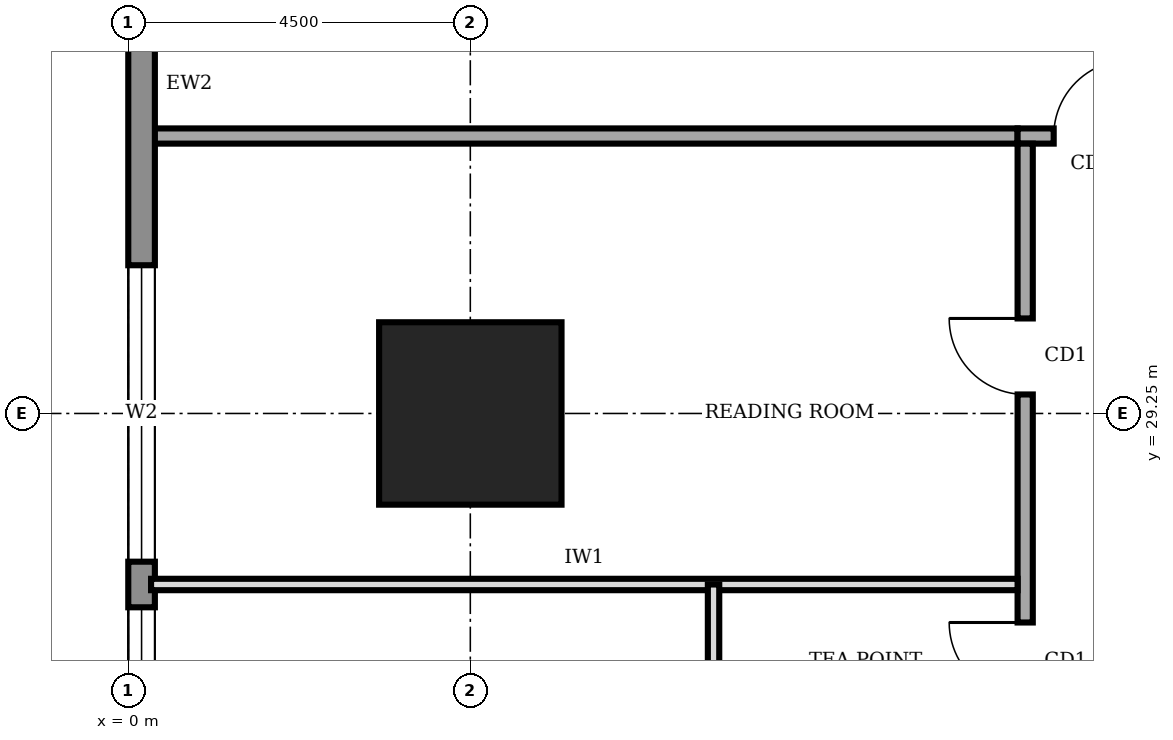
"""IFC4 building model, lengths in metres.
Left out: names, types, materials, properties, quantities, classifications, styles, units other than length and angle.
Written with IfcOpenShell. Run it as: python <this file> out.ifc"""

import sys

from ifc_helpers import new_model, si_unit, direction, frame, frame_2d, origin, origin_2d, place, context, subcontext, project, spatial, rectangle, extrude, element, fill, save


model = new_model("IFC4")
c1 = context("Model", 3, precision=1e-05, world=origin(), true_north=direction((0.0, 1.0)))
c2 = subcontext(c1, "Body", "Model", "MODEL_VIEW")
j1 = project(units=[si_unit("LENGTHUNIT", "METRE"), si_unit("PLANEANGLEUNIT", "RADIAN")], contexts=[c1])
p1 = place(None, origin())
s1 = spatial("IfcSite", under=j1, at=p1, CompositionType="ELEMENT")
p2 = place(p1, origin())
s2 = spatial("IfcBuilding", under=s1, at=p2, CompositionType="ELEMENT")
p3 = place(p2, frame((0.0, 0.0, 73.0)))
s3 = spatial("IfcBuildingStorey", under=s2, at=p3, CompositionType="ELEMENT", Elevation=73.0)
p4 = place(p3, frame((4.5, 29.25, 0.0), z_axis=(0.0, 0.0, 1.0), x_axis=(1.0, 0.0, 0.0)))
e1 = element("IfcColumn", 1, at=p4, inside=s3, PredefinedType="COLUMN", context=c2, shape_type="SweptSolid", body=[
    extrude(rectangle(XDim=2.4, YDim=2.4, at=origin_2d()), origin(), (0.0, 0.0, 1.0), 4.0),
])
p5 = place(p3, frame((0.175, 35.98, 0.0), z_axis=(0.0, 0.0, 1.0), x_axis=(0.0, -1.0, 0.0)))
e2 = element("IfcWall", 2, at=p5, inside=s3, PredefinedType="STANDARD", context=c2, shape_type="SweptSolid", body=[
    extrude(rectangle(XDim=31.46, YDim=0.35, at=frame_2d((15.73, 0.0))), origin(), (0.0, 0.0, 1.0), 3.75),
])
p6 = place(p5, frame((27.21, 0.0, 0.6)))
e3 = element("IfcOpeningElement", 3, at=p6, cuts=e2, PredefinedType="OPENING", context=c2, shape_type="SweptSolid", body=[
    extrude(rectangle(XDim=3.9, YDim=2.6, at=frame_2d((1.95, 1.3))), frame((0.0, 0.185, 0.0), z_axis=(0.0, -1.0, 0.0), x_axis=(1.0, 0.0, 0.0)), (0.0, 0.0, 1.0), 0.37),
])
p7 = place(p5, frame((22.78, 0.0, 0.6)))
e4 = element("IfcOpeningElement", 4, at=p7, cuts=e2, PredefinedType="OPENING", context=c2, shape_type="SweptSolid", body=[
    extrude(rectangle(XDim=3.9, YDim=2.6, at=frame_2d((1.95, 1.3))), frame((0.0, 0.185, 0.0), z_axis=(0.0, -1.0, 0.0), x_axis=(1.0, 0.0, 0.0)), (0.0, 0.0, 1.0), 0.37),
])
p8 = place(p5, frame((18.28, 0.0, 0.6)))
e5 = element("IfcOpeningElement", 5, at=p8, cuts=e2, PredefinedType="OPENING", context=c2, shape_type="SweptSolid", body=[
    extrude(rectangle(XDim=3.9, YDim=2.6, at=frame_2d((1.95, 1.3))), frame((0.0, 0.185, 0.0), z_axis=(0.0, -1.0, 0.0), x_axis=(1.0, 0.0, 0.0)), (0.0, 0.0, 1.0), 0.37),
])
p9 = place(p5, frame((13.78, 0.0, 0.6)))
e6 = element("IfcOpeningElement", 6, at=p9, cuts=e2, PredefinedType="OPENING", context=c2, shape_type="SweptSolid", body=[
    extrude(rectangle(XDim=3.9, YDim=2.6, at=frame_2d((1.95, 1.3))), frame((0.0, 0.185, 0.0), z_axis=(0.0, -1.0, 0.0), x_axis=(1.0, 0.0, 0.0)), (0.0, 0.0, 1.0), 0.37),
])
p10 = place(p5, frame((9.28, 0.0, 0.6)))
e7 = element("IfcOpeningElement", 7, at=p10, cuts=e2, PredefinedType="OPENING", context=c2, shape_type="SweptSolid", body=[
    extrude(rectangle(XDim=3.9, YDim=2.6, at=frame_2d((1.95, 1.3))), frame((0.0, 0.185, 0.0), z_axis=(0.0, -1.0, 0.0), x_axis=(1.0, 0.0, 0.0)), (0.0, 0.0, 1.0), 0.37),
])
p11 = place(p5, frame((4.78, 0.0, 0.6)))
e8 = element("IfcOpeningElement", 8, at=p11, cuts=e2, PredefinedType="OPENING", context=c2, shape_type="SweptSolid", body=[
    extrude(rectangle(XDim=3.9, YDim=2.6, at=frame_2d((1.95, 1.3))), frame((0.0, 0.185, 0.0), z_axis=(0.0, -1.0, 0.0), x_axis=(1.0, 0.0, 0.0)), (0.0, 0.0, 1.0), 0.37),
])
p12 = place(p3, frame((28.6, 32.9, 0.0), z_axis=(0.0, 0.0, 1.0), x_axis=(-1.0, 0.0, 0.0)))
e9 = element("IfcWall", 9, at=p12, inside=s3, PredefinedType="SOLIDWALL", context=c2, shape_type="SweptSolid", body=[
    extrude(rectangle(XDim=16.9, YDim=0.2, at=frame_2d((8.45, 0.0))), origin(), (0.0, 0.0, 1.0), 3.75),
])
p13 = place(p12, frame((15.425, 0.0, 0.0)))
e10 = element("IfcOpeningElement", 10, at=p13, cuts=e9, PredefinedType="OPENING", context=c2, shape_type="SweptSolid", body=[
    extrude(rectangle(XDim=1.0, YDim=2.1, at=frame_2d((0.5, 1.05))), frame((0.0, 0.11, 0.0), z_axis=(0.0, -1.0, 0.0), x_axis=(1.0, 0.0, 0.0)), (0.0, 0.0, 1.0), 0.22),
])
p14 = place(p12, frame((12.35, 0.0, 0.0)))
e11 = element("IfcOpeningElement", 11, at=p14, cuts=e9, PredefinedType="OPENING", context=c2, shape_type="SweptSolid", body=[
    extrude(rectangle(XDim=1.0, YDim=2.1, at=frame_2d((0.5, 1.05))), frame((0.0, 0.11, 0.0), z_axis=(0.0, -1.0, 0.0), x_axis=(1.0, 0.0, 0.0)), (0.0, 0.0, 1.0), 0.22),
])
p15 = place(p12, frame((5.6, 0.0, 0.0)))
e12 = element("IfcOpeningElement", 12, at=p15, cuts=e9, PredefinedType="OPENING", context=c2, shape_type="SweptSolid", body=[
    extrude(rectangle(XDim=1.0, YDim=2.1, at=frame_2d((0.5, 1.05))), frame((0.0, 0.11, 0.0), z_axis=(0.0, -1.0, 0.0), x_axis=(1.0, 0.0, 0.0)), (0.0, 0.0, 1.0), 0.22),
])
p16 = place(p12, frame((0.275, 0.0, 0.0)))
e13 = element("IfcOpeningElement", 13, at=p16, cuts=e9, PredefinedType="OPENING", context=c2, shape_type="SweptSolid", body=[
    extrude(rectangle(XDim=1.0, YDim=2.1, at=frame_2d((0.5, 1.05))), frame((0.0, 0.11, 0.0), z_axis=(0.0, -1.0, 0.0), x_axis=(1.0, 0.0, 0.0)), (0.0, 0.0, 1.0), 0.22),
])
p17 = place(p3, frame((11.8, 32.8, 0.0), z_axis=(0.0, 0.0, 1.0), x_axis=(0.0, -1.0, 0.0)))
e14 = element("IfcWall", 14, at=p17, inside=s3, PredefinedType="SOLIDWALL", context=c2, shape_type="SweptSolid", body=[
    extrude(rectangle(XDim=25.3, YDim=0.2, at=frame_2d((12.65, 0.0))), origin(), (0.0, 0.0, 1.0), 3.75),
])
p18 = place(p17, frame((21.8, 0.0, 0.0)))
e15 = element("IfcOpeningElement", 15, at=p18, cuts=e14, PredefinedType="OPENING", context=c2, shape_type="SweptSolid", body=[
    extrude(rectangle(XDim=1.0, YDim=2.1, at=frame_2d((0.5, 1.05))), frame((0.0, 0.11, 0.0), z_axis=(0.0, -1.0, 0.0), x_axis=(1.0, 0.0, 0.0)), (0.0, 0.0, 1.0), 0.22),
])
p19 = place(p17, frame((17.65, 0.0, 0.0)))
e16 = element("IfcOpeningElement", 16, at=p19, cuts=e14, PredefinedType="OPENING", context=c2, shape_type="SweptSolid", body=[
    extrude(rectangle(XDim=0.9, YDim=2.1, at=frame_2d((0.45, 1.05))), frame((0.0, 0.11, 0.0), z_axis=(0.0, -1.0, 0.0), x_axis=(1.0, 0.0, 0.0)), (0.0, 0.0, 1.0), 0.22),
])
p20 = place(p17, frame((14.45, 0.0, 0.0)))
e17 = element("IfcOpeningElement", 17, at=p20, cuts=e14, PredefinedType="OPENING", context=c2, shape_type="SweptSolid", body=[
    extrude(rectangle(XDim=0.9, YDim=2.1, at=frame_2d((0.45, 1.05))), frame((0.0, 0.11, 0.0), z_axis=(0.0, -1.0, 0.0), x_axis=(1.0, 0.0, 0.0)), (0.0, 0.0, 1.0), 0.22),
])
p21 = place(p17, frame((8.9, 0.0, 0.0)))
e18 = element("IfcOpeningElement", 18, at=p21, cuts=e14, PredefinedType="OPENING", context=c2, shape_type="SweptSolid", body=[
    extrude(rectangle(XDim=0.9, YDim=2.1, at=frame_2d((0.45, 1.05))), frame((0.0, 0.11, 0.0), z_axis=(0.0, -1.0, 0.0), x_axis=(1.0, 0.0, 0.0)), (0.0, 0.0, 1.0), 0.22),
])
p22 = place(p17, frame((6.3, 0.0, 0.0)))
e19 = element("IfcOpeningElement", 19, at=p22, cuts=e14, PredefinedType="OPENING", context=c2, shape_type="SweptSolid", body=[
    extrude(rectangle(XDim=1.0, YDim=2.1, at=frame_2d((0.5, 1.05))), frame((0.0, 0.11, 0.0), z_axis=(0.0, -1.0, 0.0), x_axis=(1.0, 0.0, 0.0)), (0.0, 0.0, 1.0), 0.22),
])
p23 = place(p17, frame((11.4, 0.0, 0.0)))
e20 = element("IfcOpeningElement", 20, at=p23, cuts=e14, PredefinedType="OPENING", context=c2, shape_type="SweptSolid", body=[
    extrude(rectangle(XDim=1.0, YDim=2.1, at=frame_2d((0.5, 1.05))), frame((0.0, 0.11, 0.0), z_axis=(0.0, -1.0, 0.0), x_axis=(1.0, 0.0, 0.0)), (0.0, 0.0, 1.0), 0.22),
])
p24 = place(p17, frame((2.3, 0.0, 0.0)))
e21 = element("IfcOpeningElement", 21, at=p24, cuts=e14, PredefinedType="OPENING", context=c2, shape_type="SweptSolid", body=[
    extrude(rectangle(XDim=1.0, YDim=2.1, at=frame_2d((0.5, 1.05))), frame((0.0, 0.11, 0.0), z_axis=(0.0, -1.0, 0.0), x_axis=(1.0, 0.0, 0.0)), (0.0, 0.0, 1.0), 0.22),
])
p25 = place(p3, frame((0.3, 32.9, 0.0), z_axis=(0.0, 0.0, 1.0), x_axis=(1.0, 0.0, 0.0)))
e22 = element("IfcWall", 22, at=p25, inside=s3, PredefinedType="SOLIDWALL", context=c2, shape_type="SweptSolid", body=[
    extrude(rectangle(XDim=11.4, YDim=0.2, at=frame_2d((5.7, 0.0))), origin(), (0.0, 0.0, 1.0), 3.75),
])
p26 = place(p3, frame((0.3, 27.0, 0.0), z_axis=(0.0, 0.0, 1.0), x_axis=(1.0, 0.0, 0.0)))
e23 = element("IfcWall", 23, at=p26, inside=s3, PredefinedType="PARTITIONING", context=c2, shape_type="SweptSolid", body=[
    extrude(rectangle(XDim=11.4, YDim=0.15, at=frame_2d((5.7, 0.0))), origin(), (0.0, 0.0, 1.0), 3.75),
])
p27 = place(p3, frame((7.7, 25.0, 0.0), z_axis=(0.0, 0.0, 1.0), x_axis=(0.0, 1.0, 0.0)))
e24 = element("IfcWall", 24, at=p27, inside=s3, PredefinedType="PARTITIONING", context=c2, shape_type="SweptSolid", body=[
    extrude(rectangle(XDim=2.0, YDim=0.15, at=frame_2d((1.0, 0.0))), origin(), (0.0, 0.0, 1.0), 3.75),
])
p28 = place(p10, origin())
e25 = element("IfcWindow", 25, at=p28, inside=s3, PartitioningType="SINGLE_PANEL", PredefinedType="WINDOW", context=c2, shape_type="SweptSolid", body=[
    extrude(rectangle(XDim=3.9, YDim=2.6, at=frame_2d((1.95, 1.3))), frame((0.0, 0.03, 0.0), z_axis=(0.0, -1.0, 0.0), x_axis=(1.0, 0.0, 0.0)), (0.0, 0.0, 1.0), 0.06),
])
fill(e7, e25)
p29 = place(p11, origin())
e26 = element("IfcWindow", 26, at=p29, inside=s3, PartitioningType="SINGLE_PANEL", PredefinedType="WINDOW", context=c2, shape_type="SweptSolid", body=[
    extrude(rectangle(XDim=3.9, YDim=2.6, at=frame_2d((1.95, 1.3))), frame((0.0, 0.03, 0.0), z_axis=(0.0, -1.0, 0.0), x_axis=(1.0, 0.0, 0.0)), (0.0, 0.0, 1.0), 0.06),
])
fill(e8, e26)
p30 = place(p13, frame((1.0, 0.0, 0.0), z_axis=(0.0, 0.0, 1.0), x_axis=(-1.0, 0.0, 0.0)))
e27 = element("IfcDoor", 27, at=p30, inside=s3, OperationType="SINGLE_SWING_RIGHT", PredefinedType="DOOR", context=c2, shape_type="SweptSolid", body=[
    extrude(rectangle(XDim=1.0, YDim=2.1, at=frame_2d((0.5, 1.05))), frame((0.0, 0.025, 0.0), z_axis=(0.0, -1.0, 0.0), x_axis=(1.0, 0.0, 0.0)), (0.0, 0.0, 1.0), 0.05),
])
fill(e10, e27)
p31 = place(p22, frame((1.0, 0.0, 0.0), z_axis=(0.0, 0.0, 1.0), x_axis=(-1.0, 0.0, 0.0)))
e28 = element("IfcDoor", 28, at=p31, inside=s3, OperationType="SINGLE_SWING_RIGHT", PredefinedType="DOOR", context=c2, shape_type="SweptSolid", body=[
    extrude(rectangle(XDim=1.0, YDim=2.1, at=frame_2d((0.5, 1.05))), frame((0.0, 0.025, 0.0), z_axis=(0.0, -1.0, 0.0), x_axis=(1.0, 0.0, 0.0)), (0.0, 0.0, 1.0), 0.05),
])
fill(e19, e28)
p32 = place(p24, frame((1.0, 0.0, 0.0), z_axis=(0.0, 0.0, 1.0), x_axis=(-1.0, 0.0, 0.0)))
e29 = element("IfcDoor", 29, at=p32, inside=s3, OperationType="SINGLE_SWING_RIGHT", PredefinedType="DOOR", context=c2, shape_type="SweptSolid", body=[
    extrude(rectangle(XDim=1.0, YDim=2.1, at=frame_2d((0.5, 1.05))), frame((0.0, 0.025, 0.0), z_axis=(0.0, -1.0, 0.0), x_axis=(1.0, 0.0, 0.0)), (0.0, 0.0, 1.0), 0.05),
])
fill(e21, e29)
save(model, sys.argv[1])
